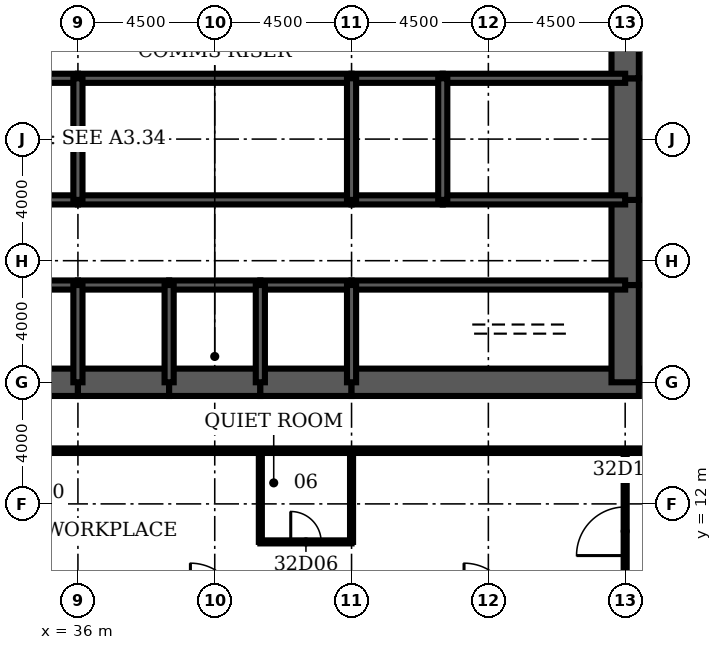
"""IFC4 building model, lengths in metres.
Left out: names, types, materials, properties, quantities, classifications, styles, units other than length and angle.
Written with IfcOpenShell. Run it as: python <this file> out.ifc"""

import sys

from ifc_helpers import new_model, si_unit, direction, frame, frame_2d, origin, place, context, subcontext, project, spatial, rectangle, extrude, element, fill, save


model = new_model("IFC4")
c1 = context("Model", 3, precision=1e-05, world=origin(), true_north=direction((0.0, 1.0)))
c2 = subcontext(c1, "Body", "Model", "MODEL_VIEW")
j1 = project(units=[si_unit("LENGTHUNIT", "METRE"), si_unit("PLANEANGLEUNIT", "RADIAN")], contexts=[c1])
p1 = place(None, origin())
s1 = spatial("IfcSite", under=j1, at=p1, CompositionType="ELEMENT")
p2 = place(p1, origin())
s2 = spatial("IfcBuilding", under=s1, at=p2, CompositionType="ELEMENT")
p3 = place(p2, frame((0.0, 0.0, 146.7)))
s3 = spatial("IfcBuildingStorey", under=s2, at=p3, CompositionType="ELEMENT", Elevation=146.7)
for number, where, z_axis, x_axis in (
    (1, (33.0, 16.0, 0.0), (0.0, 0.0, 1.0), (1.0, 0.0, 0.0)),
    (2, (36.0, 16.0, 0.0), (0.0, 0.0, 1.0), (1.0, 0.0, 0.0)),
    (3, (39.0, 16.0, 0.0), (0.0, 0.0, 1.0), (1.0, 0.0, 0.0)),
    (4, (42.0, 16.0, 0.0), (0.0, 0.0, 1.0), (1.0, 0.0, 0.0)),
):
    element("IfcWall", number, at=place(p3, frame(where, z_axis=z_axis, x_axis=x_axis)), inside=s3, PredefinedType="SHEAR", context=c2, shape_type="SweptSolid", body=[
        extrude(rectangle(XDim=3.0, YDim=0.9, at=frame_2d((1.5, 0.0))), origin(), (0.0, 0.0, 1.0), 4.2),
    ])
p4 = place(p3, frame((45.0, 16.0, 0.0), z_axis=(0.0, 0.0, 1.0), x_axis=(1.0, 0.0, 0.0)))
e5 = element("IfcWall", 5, at=p4, inside=s3, PredefinedType="SHEAR", context=c2, shape_type="SweptSolid", body=[
    extrude(rectangle(XDim=9.45, YDim=0.9, at=frame_2d((4.725, 0.0))), origin(), (0.0, 0.0, 1.0), 4.2),
])
p5 = place(p3, frame((54.0, 16.0, 0.0), z_axis=(0.0, 0.0, 1.0), x_axis=(0.0, 1.0, 0.0)))
e6 = element("IfcWall", 6, at=p5, inside=s3, PredefinedType="SHEAR", context=c2, shape_type="SweptSolid", body=[
    extrude(rectangle(XDim=3.2, YDim=0.9, at=frame_2d((1.6, 0.0))), origin(), (0.0, 0.0, 1.0), 4.2),
])
p6 = place(p3, frame((54.0, 19.2, 0.0), z_axis=(0.0, 0.0, 1.0), x_axis=(0.0, 1.0, 0.0)))
e7 = element("IfcWall", 7, at=p6, inside=s3, PredefinedType="SHEAR", context=c2, shape_type="SweptSolid", body=[
    extrude(rectangle(XDim=2.8, YDim=0.9, at=frame_2d((1.4, 0.0))), origin(), (0.0, 0.0, 1.0), 4.2),
])
p7 = place(p6, frame((0.4, 0.0, 0.0)))
e8 = element("IfcOpeningElement", 8, at=p7, cuts=e7, PredefinedType="OPENING", context=c2, shape_type="SweptSolid", body=[
    extrude(rectangle(XDim=1.8, YDim=2.1, at=frame_2d((0.9, 1.05))), frame((0.0, 0.46, 0.0), z_axis=(0.0, -1.0, 0.0), x_axis=(1.0, 0.0, 0.0)), (0.0, 0.0, 1.0), 0.92),
])
p8 = place(p3, frame((54.0, 22.0, 0.0), z_axis=(0.0, 0.0, 1.0), x_axis=(0.0, 1.0, 0.0)))
e9 = element("IfcWall", 9, at=p8, inside=s3, PredefinedType="SHEAR", context=c2, shape_type="SweptSolid", body=[
    extrude(rectangle(XDim=4.0, YDim=0.9, at=frame_2d((2.0, 0.0))), origin(), (0.0, 0.0, 1.0), 4.2),
])
p9 = place(p3, frame((54.0, 26.0, 0.0), z_axis=(0.0, 0.0, 1.0), x_axis=(0.0, 1.0, 0.0)))
e10 = element("IfcWall", 10, at=p9, inside=s3, PredefinedType="SHEAR", context=c2, shape_type="SweptSolid", body=[
    extrude(rectangle(XDim=2.8, YDim=0.9, at=frame_2d((1.4, 0.0))), origin(), (0.0, 0.0, 1.0), 4.2),
])
p10 = place(p9, frame((0.6, 0.0, 0.0)))
e11 = element("IfcOpeningElement", 11, at=p10, cuts=e10, PredefinedType="OPENING", context=c2, shape_type="SweptSolid", body=[
    extrude(rectangle(XDim=1.8, YDim=2.1, at=frame_2d((0.9, 1.05))), frame((0.0, 0.46, 0.0), z_axis=(0.0, -1.0, 0.0), x_axis=(1.0, 0.0, 0.0)), (0.0, 0.0, 1.0), 0.92),
])
p11 = place(p3, frame((33.0, 19.2, 0.0), z_axis=(0.0, 0.0, 1.0), x_axis=(1.0, 0.0, 0.0)))
e12 = element("IfcWall", 12, at=p11, inside=s3, PredefinedType="SOLIDWALL", context=c2, shape_type="SweptSolid", body=[
    extrude(rectangle(XDim=3.0, YDim=0.3, at=frame_2d((1.5, 0.0))), origin(), (0.0, 0.0, 1.0), 4.2),
])
p12 = place(p11, frame((0.95, 0.0, 0.0)))
e13 = element("IfcOpeningElement", 13, at=p12, cuts=e12, PredefinedType="OPENING", context=c2, shape_type="SweptSolid", body=[
    extrude(rectangle(XDim=1.1, YDim=2.2, at=frame_2d((0.55, 1.1))), frame((0.0, 0.16, 0.0), z_axis=(0.0, -1.0, 0.0), x_axis=(1.0, 0.0, 0.0)), (0.0, 0.0, 1.0), 0.32),
])
p13 = place(p3, frame((36.0, 19.2, 0.0), z_axis=(0.0, 0.0, 1.0), x_axis=(1.0, 0.0, 0.0)))
e14 = element("IfcWall", 14, at=p13, inside=s3, PredefinedType="SOLIDWALL", context=c2, shape_type="SweptSolid", body=[
    extrude(rectangle(XDim=3.0, YDim=0.3, at=frame_2d((1.5, 0.0))), origin(), (0.0, 0.0, 1.0), 4.2),
])
p14 = place(p13, frame((0.95, 0.0, 0.0)))
e15 = element("IfcOpeningElement", 15, at=p14, cuts=e14, PredefinedType="OPENING", context=c2, shape_type="SweptSolid", body=[
    extrude(rectangle(XDim=1.1, YDim=2.2, at=frame_2d((0.55, 1.1))), frame((0.0, 0.16, 0.0), z_axis=(0.0, -1.0, 0.0), x_axis=(1.0, 0.0, 0.0)), (0.0, 0.0, 1.0), 0.32),
])
p15 = place(p3, frame((39.0, 19.2, 0.0), z_axis=(0.0, 0.0, 1.0), x_axis=(1.0, 0.0, 0.0)))
e16 = element("IfcWall", 16, at=p15, inside=s3, PredefinedType="SOLIDWALL", context=c2, shape_type="SweptSolid", body=[
    extrude(rectangle(XDim=3.0, YDim=0.3, at=frame_2d((1.5, 0.0))), origin(), (0.0, 0.0, 1.0), 4.2),
])
p16 = place(p15, frame((1.0, 0.0, 0.0)))
e17 = element("IfcOpeningElement", 17, at=p16, cuts=e16, PredefinedType="OPENING", context=c2, shape_type="SweptSolid", body=[
    extrude(rectangle(XDim=1.0, YDim=2.1, at=frame_2d((0.5, 1.05))), frame((0.0, 0.16, 0.0), z_axis=(0.0, -1.0, 0.0), x_axis=(1.0, 0.0, 0.0)), (0.0, 0.0, 1.0), 0.32),
])
p17 = place(p3, frame((42.0, 19.2, 0.0), z_axis=(0.0, 0.0, 1.0), x_axis=(1.0, 0.0, 0.0)))
e18 = element("IfcWall", 18, at=p17, inside=s3, PredefinedType="SOLIDWALL", context=c2, shape_type="SweptSolid", body=[
    extrude(rectangle(XDim=3.0, YDim=0.3, at=frame_2d((1.5, 0.0))), origin(), (0.0, 0.0, 1.0), 4.2),
])
p18 = place(p3, frame((45.0, 19.2, 0.0), z_axis=(0.0, 0.0, 1.0), x_axis=(1.0, 0.0, 0.0)))
e19 = element("IfcWall", 19, at=p18, inside=s3, PredefinedType="SOLIDWALL", context=c2, shape_type="SweptSolid", body=[
    extrude(rectangle(XDim=9.0, YDim=0.3, at=frame_2d((4.5, 0.0))), origin(), (0.0, 0.0, 1.0), 4.2),
])
p19 = place(p18, frame((7.35, 0.0, 0.0)))
e20 = element("IfcOpeningElement", 20, at=p19, cuts=e19, PredefinedType="OPENING", context=c2, shape_type="SweptSolid", body=[
    extrude(rectangle(XDim=1.0, YDim=2.1, at=frame_2d((0.5, 1.05))), frame((0.0, 0.16, 0.0), z_axis=(0.0, -1.0, 0.0), x_axis=(1.0, 0.0, 0.0)), (0.0, 0.0, 1.0), 0.32),
])
p20 = place(p3, frame((27.0, 22.0, 0.0), z_axis=(0.0, 0.0, 1.0), x_axis=(1.0, 0.0, 0.0)))
e21 = element("IfcWall", 21, at=p20, inside=s3, PredefinedType="SOLIDWALL", context=c2, shape_type="SweptSolid", body=[
    extrude(rectangle(XDim=9.0, YDim=0.3, at=frame_2d((4.5, 0.0))), origin(), (0.0, 0.0, 1.0), 4.2),
])
p21 = place(p20, frame((4.0, 0.0, 0.0)))
e22 = element("IfcOpeningElement", 22, at=p21, cuts=e21, PredefinedType="OPENING", context=c2, shape_type="SweptSolid", body=[
    extrude(rectangle(XDim=1.0, YDim=2.1, at=frame_2d((0.5, 1.05))), frame((0.0, 0.16, 0.0), z_axis=(0.0, -1.0, 0.0), x_axis=(1.0, 0.0, 0.0)), (0.0, 0.0, 1.0), 0.32),
])
p22 = place(p3, frame((36.0, 22.0, 0.0), z_axis=(0.0, 0.0, 1.0), x_axis=(1.0, 0.0, 0.0)))
e23 = element("IfcWall", 23, at=p22, inside=s3, PredefinedType="SOLIDWALL", context=c2, shape_type="SweptSolid", body=[
    extrude(rectangle(XDim=9.0, YDim=0.3, at=frame_2d((4.5, 0.0))), origin(), (0.0, 0.0, 1.0), 4.2),
])
p23 = place(p22, frame((4.0, 0.0, 0.0)))
e24 = element("IfcOpeningElement", 24, at=p23, cuts=e23, PredefinedType="OPENING", context=c2, shape_type="SweptSolid", body=[
    extrude(rectangle(XDim=1.0, YDim=2.1, at=frame_2d((0.5, 1.05))), frame((0.0, 0.16, 0.0), z_axis=(0.0, -1.0, 0.0), x_axis=(1.0, 0.0, 0.0)), (0.0, 0.0, 1.0), 0.32),
])
p24 = place(p3, frame((45.0, 22.0, 0.0), z_axis=(0.0, 0.0, 1.0), x_axis=(1.0, 0.0, 0.0)))
e25 = element("IfcWall", 25, at=p24, inside=s3, PredefinedType="SOLIDWALL", context=c2, shape_type="SweptSolid", body=[
    extrude(rectangle(XDim=3.0, YDim=0.3, at=frame_2d((1.5, 0.0))), origin(), (0.0, 0.0, 1.0), 4.2),
])
p25 = place(p24, frame((1.0, 0.0, 0.0)))
e26 = element("IfcOpeningElement", 26, at=p25, cuts=e25, PredefinedType="OPENING", context=c2, shape_type="SweptSolid", body=[
    extrude(rectangle(XDim=1.0, YDim=2.1, at=frame_2d((0.5, 1.05))), frame((0.0, 0.16, 0.0), z_axis=(0.0, -1.0, 0.0), x_axis=(1.0, 0.0, 0.0)), (0.0, 0.0, 1.0), 0.32),
])
p26 = place(p3, frame((48.0, 22.0, 0.0), z_axis=(0.0, 0.0, 1.0), x_axis=(1.0, 0.0, 0.0)))
e27 = element("IfcWall", 27, at=p26, inside=s3, PredefinedType="SOLIDWALL", context=c2, shape_type="SweptSolid", body=[
    extrude(rectangle(XDim=6.0, YDim=0.3, at=frame_2d((3.0, 0.0))), origin(), (0.0, 0.0, 1.0), 4.2),
])
p27 = place(p26, frame((2.0, 0.0, 0.0)))
e28 = element("IfcOpeningElement", 28, at=p27, cuts=e27, PredefinedType="OPENING", context=c2, shape_type="SweptSolid", body=[
    extrude(rectangle(XDim=1.0, YDim=2.1, at=frame_2d((0.5, 1.05))), frame((0.0, 0.16, 0.0), z_axis=(0.0, -1.0, 0.0), x_axis=(1.0, 0.0, 0.0)), (0.0, 0.0, 1.0), 0.32),
])
for number, where, z_axis, x_axis in (
    (29, (27.0, 26.0, 0.0), (0.0, 0.0, 1.0), (1.0, 0.0, 0.0)),
    (30, (36.0, 26.0, 0.0), (0.0, 0.0, 1.0), (1.0, 0.0, 0.0)),
):
    element("IfcWall", number, at=place(p3, frame(where, z_axis=z_axis, x_axis=x_axis)), inside=s3, PredefinedType="SOLIDWALL", context=c2, shape_type="SweptSolid", body=[
        extrude(rectangle(XDim=9.0, YDim=0.3, at=frame_2d((4.5, 0.0))), origin(), (0.0, 0.0, 1.0), 4.2),
    ])
p28 = place(p3, frame((45.0, 26.0, 0.0), z_axis=(0.0, 0.0, 1.0), x_axis=(1.0, 0.0, 0.0)))
e31 = element("IfcWall", 31, at=p28, inside=s3, PredefinedType="SOLIDWALL", context=c2, shape_type="SweptSolid", body=[
    extrude(rectangle(XDim=3.0, YDim=0.3, at=frame_2d((1.5, 0.0))), origin(), (0.0, 0.0, 1.0), 4.2),
])
p29 = place(p3, frame((48.0, 26.0, 0.0), z_axis=(0.0, 0.0, 1.0), x_axis=(1.0, 0.0, 0.0)))
e32 = element("IfcWall", 32, at=p29, inside=s3, PredefinedType="SOLIDWALL", context=c2, shape_type="SweptSolid", body=[
    extrude(rectangle(XDim=6.0, YDim=0.3, at=frame_2d((3.0, 0.0))), origin(), (0.0, 0.0, 1.0), 4.2),
])
for number, where, z_axis, x_axis in (
    (33, (36.0, 16.0, 0.0), (0.0, 0.0, 1.0), (0.0, 1.0, 0.0)),
    (34, (39.0, 16.0, 0.0), (0.0, 0.0, 1.0), (0.0, 1.0, 0.0)),
    (35, (42.0, 16.0, 0.0), (0.0, 0.0, 1.0), (0.0, 1.0, 0.0)),
    (36, (45.0, 16.0, 0.0), (0.0, 0.0, 1.0), (0.0, 1.0, 0.0)),
):
    element("IfcWall", number, at=place(p3, frame(where, z_axis=z_axis, x_axis=x_axis)), inside=s3, PredefinedType="SOLIDWALL", context=c2, shape_type="SweptSolid", body=[
        extrude(rectangle(XDim=3.2, YDim=0.3, at=frame_2d((1.6, 0.0))), origin(), (0.0, 0.0, 1.0), 4.2),
    ])
for number, where, z_axis, x_axis in (
    (37, (36.0, 22.0, 0.0), (0.0, 0.0, 1.0), (0.0, 1.0, 0.0)),
    (38, (45.0, 22.0, 0.0), (0.0, 0.0, 1.0), (0.0, 1.0, 0.0)),
    (39, (48.0, 22.0, 0.0), (0.0, 0.0, 1.0), (0.0, 1.0, 0.0)),
):
    element("IfcWall", number, at=place(p3, frame(where, z_axis=z_axis, x_axis=x_axis)), inside=s3, PredefinedType="SOLIDWALL", context=c2, shape_type="SweptSolid", body=[
        extrude(rectangle(XDim=4.0, YDim=0.3, at=frame_2d((2.0, 0.0))), origin(), (0.0, 0.0, 1.0), 4.2),
    ])
p30 = place(p3, frame((39.15, 17.4, 0.0), z_axis=(0.0, 0.0, 1.0), x_axis=(1.0, 0.0, 0.0)))
e40 = element("IfcWall", 40, at=p30, inside=s3, PredefinedType="SOLIDWALL", context=c2, shape_type="SweptSolid", body=[
    extrude(rectangle(XDim=2.7, YDim=0.3, at=frame_2d((1.35, 0.0))), origin(), (0.0, 0.0, 1.0), 4.04),
])
p31 = place(p30, frame((0.85, 0.0, 0.0)))
e41 = element("IfcOpeningElement", 41, at=p31, cuts=e40, PredefinedType="OPENING", context=c2, shape_type="SweptSolid", body=[
    extrude(rectangle(XDim=1.0, YDim=2.1, at=frame_2d((0.5, 1.05))), frame((0.0, 0.16, 0.0), z_axis=(0.0, -1.0, 0.0), x_axis=(1.0, 0.0, 0.0)), (0.0, 0.0, 1.0), 0.32),
])
p32 = place(p3, frame((42.0, 22.15, 0.0), z_axis=(0.0, 0.0, 1.0), x_axis=(0.0, 1.0, 0.0)))
e42 = element("IfcWall", 42, at=p32, inside=s3, PredefinedType="PARTITIONING", context=c2, shape_type="SweptSolid", body=[
    extrude(rectangle(XDim=3.7, YDim=0.15, at=frame_2d((1.85, 0.0))), origin(), (0.0, 0.0, 1.0), 3.0),
])
p33 = place(p32, frame((2.2, 0.0, 0.0)))
e43 = element("IfcOpeningElement", 43, at=p33, cuts=e42, PredefinedType="OPENING", context=c2, shape_type="SweptSolid", body=[
    extrude(rectangle(XDim=1.0, YDim=2.1, at=frame_2d((0.5, 1.05))), frame((0.0, 0.085, 0.0), z_axis=(0.0, -1.0, 0.0), x_axis=(1.0, 0.0, 0.0)), (0.0, 0.0, 1.0), 0.17),
])
p34 = place(p3, frame((47.7, 19.35, 0.0), z_axis=(0.0, 0.0, 1.0), x_axis=(0.0, 1.0, 0.0)))
e44 = element("IfcWall", 44, at=p34, inside=s3, PredefinedType="PARTITIONING", context=c2, shape_type="SweptSolid", body=[
    extrude(rectangle(XDim=2.5, YDim=0.15, at=frame_2d((1.25, 0.0))), origin(), (0.0, 0.0, 1.0), 3.0),
])
p35 = place(p34, frame((1.15, 0.0, 0.0)))
e45 = element("IfcOpeningElement", 45, at=p35, cuts=e44, PredefinedType="OPENING", context=c2, shape_type="SweptSolid", body=[
    extrude(rectangle(XDim=1.0, YDim=2.1, at=frame_2d((0.5, 1.05))), frame((0.0, 0.085, 0.0), z_axis=(0.0, -1.0, 0.0), x_axis=(1.0, 0.0, 0.0)), (0.0, 0.0, 1.0), 0.17),
])
p36 = place(p3, frame((42.0, 10.75, 0.0), z_axis=(0.0, 0.0, 1.0), x_axis=(1.0, 0.0, 0.0)))
e46 = element("IfcWall", 46, at=p36, inside=s3, PredefinedType="PARTITIONING", context=c2, shape_type="SweptSolid", body=[
    extrude(rectangle(XDim=3.0, YDim=0.1, at=frame_2d((1.5, 0.0))), origin(), (0.0, 0.0, 1.0), 3.0),
])
p37 = place(p36, frame((1.0, 0.0, 0.0)))
e47 = element("IfcOpeningElement", 47, at=p37, cuts=e46, PredefinedType="OPENING", context=c2, shape_type="SweptSolid", body=[
    extrude(rectangle(XDim=1.0, YDim=2.1, at=frame_2d((0.5, 1.05))), frame((0.0, 0.06, 0.0), z_axis=(0.0, -1.0, 0.0), x_axis=(1.0, 0.0, 0.0)), (0.0, 0.0, 1.0), 0.12),
])
p38 = place(p3, frame((15.15, 13.75, 0.0), z_axis=(0.0, 0.0, 1.0), x_axis=(1.0, 0.0, 0.0)))
e48 = element("IfcWall", 48, at=p38, inside=s3, PredefinedType="PARTITIONING", context=c2, shape_type="SweptSolid", body=[
    extrude(rectangle(XDim=41.7, YDim=0.15, at=frame_2d((20.85, 0.0))), origin(), (0.0, 0.0, 1.0), 3.0),
])
p39 = place(p38, frame((18.75, 0.0, 0.0)))
e49 = element("IfcOpeningElement", 49, at=p39, cuts=e48, PredefinedType="OPENING", context=c2, shape_type="SweptSolid", body=[
    extrude(rectangle(XDim=1.2, YDim=2.1, at=frame_2d((0.6, 1.05))), frame((0.0, 0.085, 0.0), z_axis=(0.0, -1.0, 0.0), x_axis=(1.0, 0.0, 0.0)), (0.0, 0.0, 1.0), 0.17),
])
for number, where, z_axis, x_axis in (
    (50, (42.0, 10.75, 0.0), (0.0, 0.0, 1.0), (0.0, 1.0, 0.0)),
    (51, (45.0, 10.75, 0.0), (0.0, 0.0, 1.0), (0.0, 1.0, 0.0)),
):
    element("IfcWall", number, at=place(p3, frame(where, z_axis=z_axis, x_axis=x_axis)), inside=s3, PredefinedType="PARTITIONING", context=c2, shape_type="SweptSolid", body=[
        extrude(rectangle(XDim=3.0, YDim=0.1, at=frame_2d((1.5, 0.0))), origin(), (0.0, 0.0, 1.0), 3.0),
    ])
p40 = place(p3, frame((54.0, 8.45, 0.0), z_axis=(0.0, 0.0, 1.0), x_axis=(0.0, 1.0, 0.0)))
e52 = element("IfcWall", 52, at=p40, inside=s3, PredefinedType="PARTITIONING", context=c2, shape_type="SweptSolid", body=[
    extrude(rectangle(XDim=5.3, YDim=0.1, at=frame_2d((2.65, 0.0))), origin(), (0.0, 0.0, 1.0), 3.0),
])
p41 = place(p40, frame((1.85, 0.0, 0.0)))
e53 = element("IfcOpeningElement", 53, at=p41, cuts=e52, PredefinedType="OPENING", context=c2, shape_type="SweptSolid", body=[
    extrude(rectangle(XDim=1.6, YDim=2.1, at=frame_2d((0.8, 1.05))), frame((0.0, 0.06, 0.0), z_axis=(0.0, -1.0, 0.0), x_axis=(1.0, 0.0, 0.0)), (0.0, 0.0, 1.0), 0.12),
])
p42 = place(p31, origin())
e54 = element("IfcDoor", 54, at=p42, inside=s3, OperationType="SINGLE_SWING_LEFT", PredefinedType="DOOR", context=c2, shape_type="SweptSolid", body=[
    extrude(rectangle(XDim=1.0, YDim=2.1, at=frame_2d((0.5, 1.05))), frame((0.0, 0.025, 0.0), z_axis=(0.0, -1.0, 0.0), x_axis=(1.0, 0.0, 0.0)), (0.0, 0.0, 1.0), 0.05),
])
fill(e41, e54)
p43 = place(p33, origin())
e55 = element("IfcDoor", 55, at=p43, inside=s3, OperationType="SINGLE_SWING_RIGHT", PredefinedType="DOOR", context=c2, shape_type="SweptSolid", body=[
    extrude(rectangle(XDim=1.0, YDim=2.1, at=frame_2d((0.5, 1.05))), frame((0.0, 0.025, 0.0), z_axis=(0.0, -1.0, 0.0), x_axis=(1.0, 0.0, 0.0)), (0.0, 0.0, 1.0), 0.05),
])
fill(e43, e55)
p44 = place(p35, origin())
e56 = element("IfcDoor", 56, at=p44, inside=s3, OperationType="SINGLE_SWING_RIGHT", PredefinedType="DOOR", context=c2, shape_type="SweptSolid", body=[
    extrude(rectangle(XDim=1.0, YDim=2.1, at=frame_2d((0.5, 1.05))), frame((0.0, 0.025, 0.0), z_axis=(0.0, -1.0, 0.0), x_axis=(1.0, 0.0, 0.0)), (0.0, 0.0, 1.0), 0.05),
])
fill(e45, e56)
p45 = place(p37, origin())
e57 = element("IfcDoor", 57, at=p45, inside=s3, OperationType="SINGLE_SWING_LEFT", PredefinedType="DOOR", context=c2, shape_type="SweptSolid", body=[
    extrude(rectangle(XDim=1.0, YDim=2.1, at=frame_2d((0.5, 1.05))), frame((0.0, 0.025, 0.0), z_axis=(0.0, -1.0, 0.0), x_axis=(1.0, 0.0, 0.0)), (0.0, 0.0, 1.0), 0.05),
])
fill(e47, e57)
p46 = place(p41, origin())
e58 = element("IfcDoor", 58, at=p46, inside=s3, OperationType="SINGLE_SWING_LEFT", PredefinedType="DOOR", context=c2, shape_type="SweptSolid", body=[
    extrude(rectangle(XDim=1.6, YDim=2.1, at=frame_2d((0.8, 1.05))), frame((0.0, 0.025, 0.0), z_axis=(0.0, -1.0, 0.0), x_axis=(1.0, 0.0, 0.0)), (0.0, 0.0, 1.0), 0.05),
])
fill(e53, e58)
p47 = place(p14, origin())
e59 = element("IfcDoor", 59, at=p47, inside=s3, OperationType="DOUBLE_DOOR_SLIDING", PredefinedType="USERDEFINED", context=c2, shape_type="SweptSolid", body=[
    extrude(rectangle(XDim=1.1, YDim=2.2, at=frame_2d((0.55, 1.1))), frame((0.0, 0.025, 0.0), z_axis=(0.0, -1.0, 0.0), x_axis=(1.0, 0.0, 0.0)), (0.0, 0.0, 1.0), 0.05),
])
fill(e15, e59)
p48 = place(p19, origin())
e60 = element("IfcDoor", 60, at=p48, inside=s3, OperationType="SINGLE_SWING_RIGHT", PredefinedType="DOOR", context=c2, shape_type="SweptSolid", body=[
    extrude(rectangle(XDim=1.0, YDim=2.1, at=frame_2d((0.5, 1.05))), frame((0.0, 0.025, 0.0), z_axis=(0.0, -1.0, 0.0), x_axis=(1.0, 0.0, 0.0)), (0.0, 0.0, 1.0), 0.05),
])
fill(e20, e60)
p49 = place(p7, origin())
e61 = element("IfcDoor", 61, at=p49, inside=s3, OperationType="SINGLE_SWING_LEFT", PredefinedType="DOOR", context=c2, shape_type="SweptSolid", body=[
    extrude(rectangle(XDim=1.8, YDim=2.1, at=frame_2d((0.9, 1.05))), frame((0.0, 0.45, 0.0), z_axis=(0.0, -1.0, 0.0), x_axis=(1.0, 0.0, 0.0)), (0.0, 0.0, 1.0), 0.899),
])
fill(e8, e61)
p50 = place(p10, origin())
e62 = element("IfcDoor", 62, at=p50, inside=s3, OperationType="SINGLE_SWING_LEFT", PredefinedType="DOOR", context=c2, shape_type="SweptSolid", body=[
    extrude(rectangle(XDim=1.8, YDim=2.1, at=frame_2d((0.9, 1.05))), frame((0.0, 0.45, 0.0), z_axis=(0.0, -1.0, 0.0), x_axis=(1.0, 0.0, 0.0)), (0.0, 0.0, 1.0), 0.899),
])
fill(e11, e62)
p51 = place(p23, origin())
e63 = element("IfcDoor", 63, at=p51, inside=s3, OperationType="SINGLE_SWING_LEFT", PredefinedType="DOOR", context=c2, shape_type="SweptSolid", body=[
    extrude(rectangle(XDim=1.0, YDim=2.1, at=frame_2d((0.5, 1.05))), frame((0.0, 0.025, 0.0), z_axis=(0.0, -1.0, 0.0), x_axis=(1.0, 0.0, 0.0)), (0.0, 0.0, 1.0), 0.05),
])
fill(e24, e63)
p52 = place(p25, origin())
e64 = element("IfcDoor", 64, at=p52, inside=s3, OperationType="SINGLE_SWING_LEFT", PredefinedType="DOOR", context=c2, shape_type="SweptSolid", body=[
    extrude(rectangle(XDim=1.0, YDim=2.1, at=frame_2d((0.5, 1.05))), frame((0.0, 0.025, 0.0), z_axis=(0.0, -1.0, 0.0), x_axis=(1.0, 0.0, 0.0)), (0.0, 0.0, 1.0), 0.05),
])
fill(e26, e64)
p53 = place(p27, origin())
e65 = element("IfcDoor", 65, at=p53, inside=s3, OperationType="SINGLE_SWING_LEFT", PredefinedType="DOOR", context=c2, shape_type="SweptSolid", body=[
    extrude(rectangle(XDim=1.0, YDim=2.1, at=frame_2d((0.5, 1.05))), frame((0.0, 0.025, 0.0), z_axis=(0.0, -1.0, 0.0), x_axis=(1.0, 0.0, 0.0)), (0.0, 0.0, 1.0), 0.05),
])
fill(e28, e65)
p54 = place(p16, origin())
e66 = element("IfcDoor", 66, at=p54, inside=s3, OperationType="SINGLE_SWING_LEFT", PredefinedType="DOOR", context=c2, shape_type="SweptSolid", body=[
    extrude(rectangle(XDim=1.0, YDim=2.1, at=frame_2d((0.5, 1.05))), frame((0.0, 0.025, 0.0), z_axis=(0.0, -1.0, 0.0), x_axis=(1.0, 0.0, 0.0)), (0.0, 0.0, 1.0), 0.05),
])
fill(e17, e66)
save(model, sys.argv[1])
